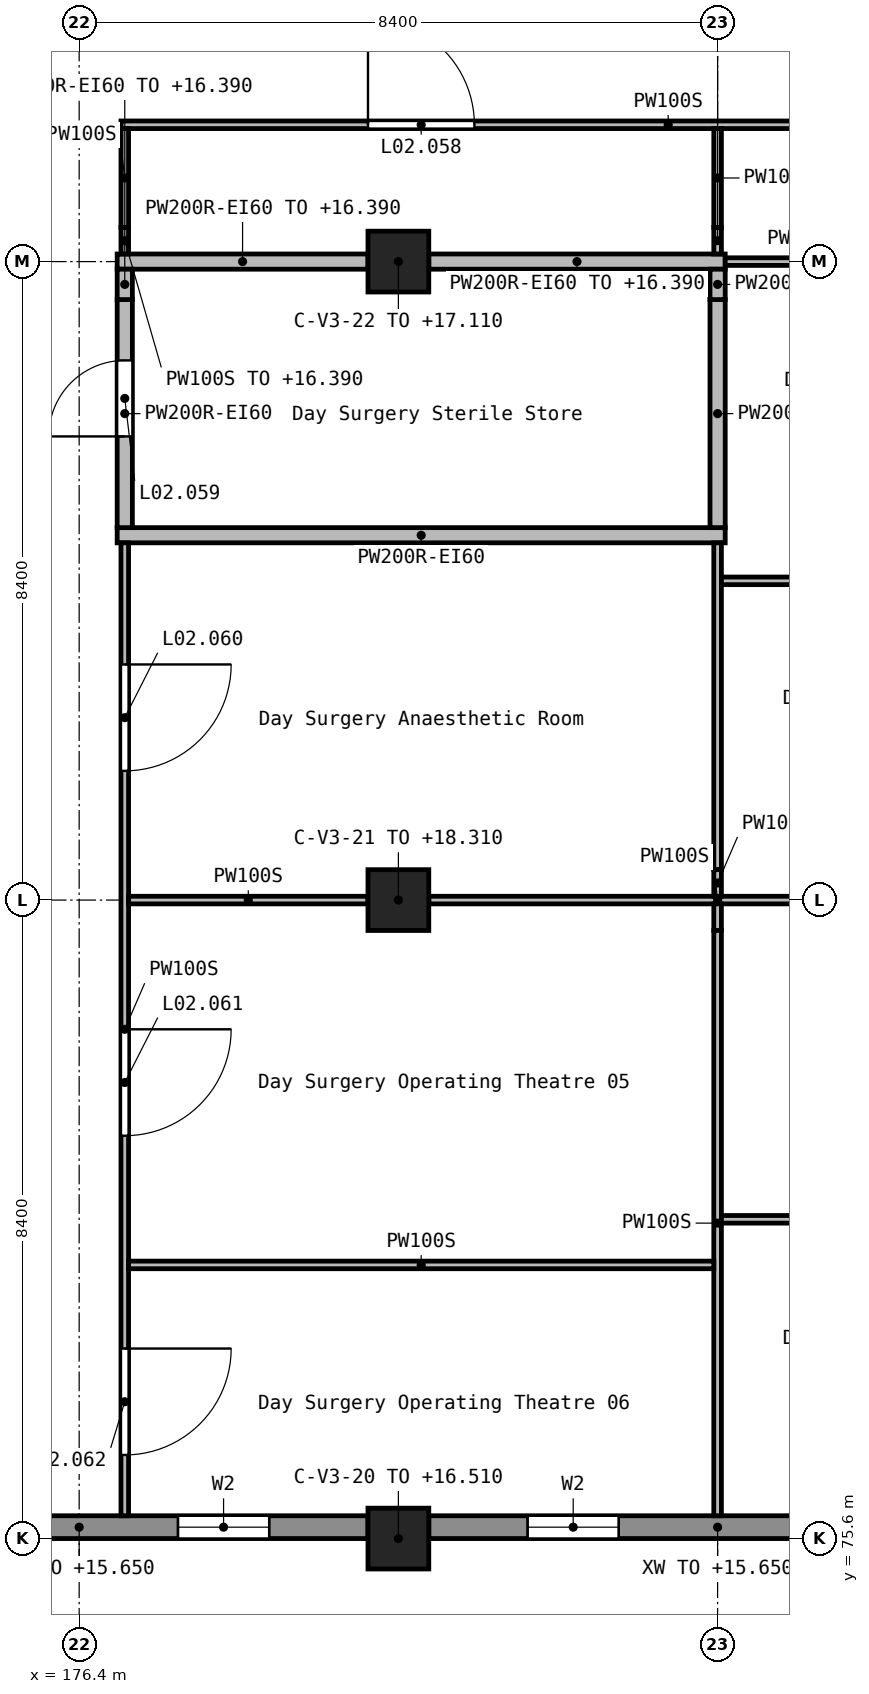
"""IFC4 building model, lengths in metres.
Left out: names, types, materials, properties, quantities, classifications, styles, units other than length and angle.
Written with IfcOpenShell. Run it as: python <this file> out.ifc"""

import sys

from ifc_helpers import new_model, si_unit, direction, frame, frame_2d, origin, origin_2d, place, context, subcontext, project, spatial, rectangle, extrude, element, fill, save


model = new_model("IFC4")
c1 = context("Model", 3, precision=1e-05, world=origin(), true_north=direction((0.0, 1.0)))
c2 = subcontext(c1, "Body", "Model", "MODEL_VIEW")
j1 = project(units=[si_unit("LENGTHUNIT", "METRE"), si_unit("PLANEANGLEUNIT", "RADIAN")], contexts=[c1])
p1 = place(None, origin())
s1 = spatial("IfcSite", under=j1, at=p1, CompositionType="ELEMENT")
p2 = place(p1, origin())
s2 = spatial("IfcBuilding", under=s1, at=p2, CompositionType="ELEMENT")
p3 = place(p2, frame((0.0, 0.0, 12.6)))
s3 = spatial("IfcBuildingStorey", under=s2, at=p3, CompositionType="ELEMENT", Elevation=12.6)
p4 = place(p3, frame((180.6, 75.6, 0.0), z_axis=(0.0, 0.0, 1.0), x_axis=(1.0, 0.0, 0.0)))
e1 = element("IfcColumn", 1, at=p4, inside=s3, PredefinedType="COLUMN", context=c2, shape_type="SweptSolid", body=[
    extrude(rectangle(XDim=0.8, YDim=0.8, at=origin_2d()), origin(), (0.0, 0.0, 1.0), 3.91),
])
p5 = place(p3, frame((180.6, 84.0, 0.0), z_axis=(0.0, 0.0, 1.0), x_axis=(1.0, 0.0, 0.0)))
e2 = element("IfcColumn", 2, at=p5, inside=s3, PredefinedType="COLUMN", context=c2, shape_type="SweptSolid", body=[
    extrude(rectangle(XDim=0.8, YDim=0.8, at=origin_2d()), origin(), (0.0, 0.0, 1.0), 5.71),
])
p6 = place(p3, frame((180.6, 92.4, 0.0), z_axis=(0.0, 0.0, 1.0), x_axis=(1.0, 0.0, 0.0)))
e3 = element("IfcColumn", 3, at=p6, inside=s3, PredefinedType="COLUMN", context=c2, shape_type="SweptSolid", body=[
    extrude(rectangle(XDim=0.8, YDim=0.8, at=origin_2d()), origin(), (0.0, 0.0, 1.0), 4.51),
])
p7 = place(p3, frame((172.6, 75.75, 0.0), z_axis=(0.0, 0.0, 1.0), x_axis=(1.0, 0.0, 0.0)))
e4 = element("IfcWall", 4, at=p7, inside=s3, PredefinedType="STANDARD", context=c2, shape_type="SweptSolid", body=[
    extrude(rectangle(XDim=7.6, YDim=0.3, at=frame_2d((3.8, 0.0))), origin(), (0.0, 0.0, 1.0), 3.05),
])
p8 = place(p7, frame((1.6, 0.0, 1.2)))
e5 = element("IfcOpeningElement", 5, at=p8, cuts=e4, PredefinedType="OPENING", context=c2, shape_type="SweptSolid", body=[
    extrude(rectangle(XDim=1.2, YDim=1.2, at=frame_2d((0.6, 0.6))), frame((0.0, 0.16, 0.0), z_axis=(0.0, -1.0, 0.0), x_axis=(1.0, 0.0, 0.0)), (0.0, 0.0, 1.0), 0.32),
])
p9 = place(p7, frame((5.1, 0.0, 1.2)))
e6 = element("IfcOpeningElement", 6, at=p9, cuts=e4, PredefinedType="OPENING", context=c2, shape_type="SweptSolid", body=[
    extrude(rectangle(XDim=1.2, YDim=1.2, at=frame_2d((0.6, 0.6))), frame((0.0, 0.16, 0.0), z_axis=(0.0, -1.0, 0.0), x_axis=(1.0, 0.0, 0.0)), (0.0, 0.0, 1.0), 0.32),
])
p10 = place(p3, frame((181.0, 75.75, 0.0), z_axis=(0.0, 0.0, 1.0), x_axis=(1.0, 0.0, 0.0)))
e7 = element("IfcWall", 7, at=p10, inside=s3, PredefinedType="STANDARD", context=c2, shape_type="SweptSolid", body=[
    extrude(rectangle(XDim=7.6, YDim=0.3, at=frame_2d((3.8, 0.0))), origin(), (0.0, 0.0, 1.0), 3.05),
])
p11 = place(p10, frame((1.3, 0.0, 1.2)))
e8 = element("IfcOpeningElement", 8, at=p11, cuts=e7, PredefinedType="OPENING", context=c2, shape_type="SweptSolid", body=[
    extrude(rectangle(XDim=1.2, YDim=1.2, at=frame_2d((0.6, 0.6))), frame((0.0, 0.16, 0.0), z_axis=(0.0, -1.0, 0.0), x_axis=(1.0, 0.0, 0.0)), (0.0, 0.0, 1.0), 0.32),
])
p12 = place(p10, frame((5.1, 0.0, 1.2)))
e9 = element("IfcOpeningElement", 9, at=p12, cuts=e7, PredefinedType="OPENING", context=c2, shape_type="SweptSolid", body=[
    extrude(rectangle(XDim=1.2, YDim=1.2, at=frame_2d((0.6, 0.6))), frame((0.0, 0.16, 0.0), z_axis=(0.0, -1.0, 0.0), x_axis=(1.0, 0.0, 0.0)), (0.0, 0.0, 1.0), 0.32),
])
p13 = place(p3, frame((176.9, 88.8, 0.0), z_axis=(0.0, 0.0, 1.0), x_axis=(1.0, 0.0, 0.0)))
e10 = element("IfcWall", 10, at=p13, inside=s3, PredefinedType="SOLIDWALL", context=c2, shape_type="SweptSolid", body=[
    extrude(rectangle(XDim=8.0, YDim=0.2, at=frame_2d((4.0, 0.0))), origin(), (0.0, 0.0, 1.0), 3.85),
])
p14 = place(p3, frame((176.9, 92.4, 0.0), z_axis=(0.0, 0.0, 1.0), x_axis=(1.0, 0.0, 0.0)))
e11 = element("IfcWall", 11, at=p14, inside=s3, PredefinedType="SOLIDWALL", context=c2, shape_type="SweptSolid", body=[
    extrude(rectangle(XDim=3.3, YDim=0.2, at=frame_2d((1.65, 0.0))), origin(), (0.0, 0.0, 1.0), 3.79),
])
p15 = place(p3, frame((181.0, 92.4, 0.0), z_axis=(0.0, 0.0, 1.0), x_axis=(1.0, 0.0, 0.0)))
e12 = element("IfcWall", 12, at=p15, inside=s3, PredefinedType="SOLIDWALL", context=c2, shape_type="SweptSolid", body=[
    extrude(rectangle(XDim=3.9, YDim=0.2, at=frame_2d((1.95, 0.0))), origin(), (0.0, 0.0, 1.0), 3.79),
])
p16 = place(p3, frame((177.0, 88.9, 0.0), z_axis=(0.0, 0.0, 1.0), x_axis=(0.0, 1.0, 0.0)))
e13 = element("IfcWall", 13, at=p16, inside=s3, PredefinedType="SOLIDWALL", context=c2, shape_type="SweptSolid", body=[
    extrude(rectangle(XDim=3.0, YDim=0.2, at=frame_2d((1.5, 0.0))), origin(), (0.0, 0.0, 1.0), 3.85),
])
p17 = place(p16, frame((1.2, 0.0, 0.0)))
e14 = element("IfcOpeningElement", 14, at=p17, cuts=e13, PredefinedType="OPENING", context=c2, shape_type="SweptSolid", body=[
    extrude(rectangle(XDim=1.0, YDim=2.1, at=frame_2d((0.5, 1.05))), frame((0.0, 0.11, 0.0), z_axis=(0.0, -1.0, 0.0), x_axis=(1.0, 0.0, 0.0)), (0.0, 0.0, 1.0), 0.22),
])
p18 = place(p3, frame((177.0, 91.9, 0.0), z_axis=(0.0, 0.0, 1.0), x_axis=(0.0, 1.0, 0.0)))
e15 = element("IfcWall", 15, at=p18, inside=s3, PredefinedType="SOLIDWALL", context=c2, shape_type="SweptSolid", body=[
    extrude(rectangle(XDim=0.4, YDim=0.2, at=frame_2d((0.2, 0.0))), origin(), (0.0, 0.0, 1.0), 3.79),
])
p19 = place(p3, frame((184.8, 88.9, 0.0), z_axis=(0.0, 0.0, 1.0), x_axis=(0.0, 1.0, 0.0)))
e16 = element("IfcWall", 16, at=p19, inside=s3, PredefinedType="SOLIDWALL", context=c2, shape_type="SweptSolid", body=[
    extrude(rectangle(XDim=3.0, YDim=0.2, at=frame_2d((1.5, 0.0))), origin(), (0.0, 0.0, 1.0), 3.85),
])
p20 = place(p3, frame((184.8, 91.9, 0.0), z_axis=(0.0, 0.0, 1.0), x_axis=(0.0, 1.0, 0.0)))
e17 = element("IfcWall", 17, at=p20, inside=s3, PredefinedType="SOLIDWALL", context=c2, shape_type="SweptSolid", body=[
    extrude(rectangle(XDim=0.4, YDim=0.2, at=frame_2d((0.2, 0.0))), origin(), (0.0, 0.0, 1.0), 3.79),
])
p21 = place(p3, frame((177.0, 88.7, 0.0), z_axis=(0.0, 0.0, 1.0), x_axis=(0.0, -1.0, 0.0)))
e18 = element("IfcWall", 18, at=p21, inside=s3, PredefinedType="PARTITIONING", context=c2, shape_type="SweptSolid", body=[
    extrude(rectangle(XDim=12.8, YDim=0.1, at=frame_2d((6.4, 0.0))), origin(), (0.0, 0.0, 1.0), 3.85),
])
p22 = place(p21, frame((1.6, 0.0, 0.0)))
e19 = element("IfcOpeningElement", 19, at=p22, cuts=e18, PredefinedType="OPENING", context=c2, shape_type="SweptSolid", body=[
    extrude(rectangle(XDim=1.4, YDim=2.1, at=frame_2d((0.7, 1.05))), frame((0.0, 0.06, 0.0), z_axis=(0.0, -1.0, 0.0), x_axis=(1.0, 0.0, 0.0)), (0.0, 0.0, 1.0), 0.12),
])
p23 = place(p21, frame((6.4, 0.0, 0.0)))
e20 = element("IfcOpeningElement", 20, at=p23, cuts=e18, PredefinedType="OPENING", context=c2, shape_type="SweptSolid", body=[
    extrude(rectangle(XDim=1.4, YDim=2.1, at=frame_2d((0.7, 1.05))), frame((0.0, 0.06, 0.0), z_axis=(0.0, -1.0, 0.0), x_axis=(1.0, 0.0, 0.0)), (0.0, 0.0, 1.0), 0.12),
])
p24 = place(p21, frame((10.6, 0.0, 0.0)))
e21 = element("IfcOpeningElement", 21, at=p24, cuts=e18, PredefinedType="OPENING", context=c2, shape_type="SweptSolid", body=[
    extrude(rectangle(XDim=1.4, YDim=2.1, at=frame_2d((0.7, 1.05))), frame((0.0, 0.06, 0.0), z_axis=(0.0, -1.0, 0.0), x_axis=(1.0, 0.0, 0.0)), (0.0, 0.0, 1.0), 0.12),
])
p25 = place(p3, frame((177.05, 84.0, 0.0), z_axis=(0.0, 0.0, 1.0), x_axis=(1.0, 0.0, 0.0)))
e22 = element("IfcWall", 22, at=p25, inside=s3, PredefinedType="PARTITIONING", context=c2, shape_type="SweptSolid", body=[
    extrude(rectangle(XDim=3.15, YDim=0.1, at=frame_2d((1.575, 0.0))), origin(), (0.0, 0.0, 1.0), 3.85),
])
p26 = place(p3, frame((181.0, 84.0, 0.0), z_axis=(0.0, 0.0, 1.0), x_axis=(1.0, 0.0, 0.0)))
e23 = element("IfcWall", 23, at=p26, inside=s3, PredefinedType="PARTITIONING", context=c2, shape_type="SweptSolid", body=[
    extrude(rectangle(XDim=7.6, YDim=0.1, at=frame_2d((3.8, 0.0))), origin(), (0.0, 0.0, 1.0), 3.85),
])
p27 = place(p3, frame((176.95, 94.2, 0.0), z_axis=(0.0, 0.0, 1.0), x_axis=(1.0, 0.0, 0.0)))
e24 = element("IfcWall", 24, at=p27, inside=s3, PredefinedType="PARTITIONING", context=c2, shape_type="SweptSolid", body=[
    extrude(rectangle(XDim=14.4, YDim=0.1, at=frame_2d((7.2, 0.0))), origin(), (0.0, 0.0, 1.0), 3.85),
])
p28 = place(p27, frame((3.25, 0.0, 0.0)))
e25 = element("IfcOpeningElement", 25, at=p28, cuts=e24, PredefinedType="OPENING", context=c2, shape_type="SweptSolid", body=[
    extrude(rectangle(XDim=1.4, YDim=2.1, at=frame_2d((0.7, 1.05))), frame((0.0, 0.06, 0.0), z_axis=(0.0, -1.0, 0.0), x_axis=(1.0, 0.0, 0.0)), (0.0, 0.0, 1.0), 0.12),
])
p29 = place(p27, frame((10.45, 0.0, 0.0)))
e26 = element("IfcOpeningElement", 26, at=p29, cuts=e24, PredefinedType="OPENING", context=c2, shape_type="SweptSolid", body=[
    extrude(rectangle(XDim=1.4, YDim=2.1, at=frame_2d((0.7, 1.05))), frame((0.0, 0.06, 0.0), z_axis=(0.0, -1.0, 0.0), x_axis=(1.0, 0.0, 0.0)), (0.0, 0.0, 1.0), 0.12),
])
p30 = place(p3, frame((184.8, 88.7, 0.0), z_axis=(0.0, 0.0, 1.0), x_axis=(0.0, -1.0, 0.0)))
e27 = element("IfcWall", 27, at=p30, inside=s3, PredefinedType="PARTITIONING", context=c2, shape_type="SweptSolid", body=[
    extrude(rectangle(XDim=4.3, YDim=0.1, at=frame_2d((2.15, 0.0))), origin(), (0.0, 0.0, 1.0), 3.85),
])
for number, where, z_axis, x_axis in (
    (28, (184.8, 84.4, 0.0), (0.0, 0.0, 1.0), (0.0, -1.0, 0.0)),
    (29, (184.8, 83.95, 0.0), (0.0, 0.0, 1.0), (0.0, -1.0, 0.0)),
):
    element("IfcWall", number, at=place(p3, frame(where, z_axis=z_axis, x_axis=x_axis)), inside=s3, PredefinedType="PARTITIONING", context=c2, shape_type="SweptSolid", body=[
        extrude(rectangle(XDim=0.35, YDim=0.1, at=frame_2d((0.175, 0.0))), origin(), (0.0, 0.0, 1.0), 3.85),
    ])
p31 = place(p3, frame((184.8, 83.6, 0.0), z_axis=(0.0, 0.0, 1.0), x_axis=(0.0, -1.0, 0.0)))
e30 = element("IfcWall", 30, at=p31, inside=s3, PredefinedType="PARTITIONING", context=c2, shape_type="SweptSolid", body=[
    extrude(rectangle(XDim=7.7, YDim=0.1, at=frame_2d((3.85, 0.0))), origin(), (0.0, 0.0, 1.0), 3.85),
])
p32 = place(p3, frame((177.05, 79.2, 0.0), z_axis=(0.0, 0.0, 1.0), x_axis=(1.0, 0.0, 0.0)))
e31 = element("IfcWall", 31, at=p32, inside=s3, PredefinedType="PARTITIONING", context=c2, shape_type="SweptSolid", body=[
    extrude(rectangle(XDim=7.7, YDim=0.1, at=frame_2d((3.85, 0.0))), origin(), (0.0, 0.0, 1.0), 3.85),
])
for number, where, z_axis, x_axis in (
    (32, (184.85, 79.8, 0.0), (0.0, 0.0, 1.0), (1.0, 0.0, 0.0)),
    (33, (184.85, 88.2, 0.0), (0.0, 0.0, 1.0), (1.0, 0.0, 0.0)),
):
    element("IfcWall", number, at=place(p3, frame(where, z_axis=z_axis, x_axis=x_axis)), inside=s3, PredefinedType="PARTITIONING", context=c2, shape_type="SweptSolid", body=[
        extrude(rectangle(XDim=6.5, YDim=0.1, at=frame_2d((3.25, 0.0))), origin(), (0.0, 0.0, 1.0), 3.85),
    ])
p33 = place(p3, frame((184.9, 92.4, 0.0), z_axis=(0.0, 0.0, 1.0), x_axis=(1.0, 0.0, 0.0)))
e34 = element("IfcWall", 34, at=p33, inside=s3, PredefinedType="PARTITIONING", context=c2, shape_type="SweptSolid", body=[
    extrude(rectangle(XDim=3.7, YDim=0.1, at=frame_2d((1.85, 0.0))), origin(), (0.0, 0.0, 1.0), 3.79),
])
p34 = place(p3, frame((177.0, 92.5, 0.0), z_axis=(0.0, 0.0, 1.0), x_axis=(0.0, 1.0, 0.0)))
e35 = element("IfcWall", 35, at=p34, inside=s3, PredefinedType="PARTITIONING", context=c2, shape_type="SweptSolid", body=[
    extrude(rectangle(XDim=0.35, YDim=0.1, at=frame_2d((0.175, 0.0))), origin(), (0.0, 0.0, 1.0), 3.79),
])
p35 = place(p3, frame((177.0, 92.85, 0.0), z_axis=(0.0, 0.0, 1.0), x_axis=(0.0, 1.0, 0.0)))
e36 = element("IfcWall", 36, at=p35, inside=s3, PredefinedType="PARTITIONING", context=c2, shape_type="SweptSolid", body=[
    extrude(rectangle(XDim=1.3, YDim=0.1, at=frame_2d((0.65, 0.0))), origin(), (0.0, 0.0, 1.0), 3.85),
])
p36 = place(p3, frame((184.8, 92.5, 0.0), z_axis=(0.0, 0.0, 1.0), x_axis=(0.0, 1.0, 0.0)))
e37 = element("IfcWall", 37, at=p36, inside=s3, PredefinedType="PARTITIONING", context=c2, shape_type="SweptSolid", body=[
    extrude(rectangle(XDim=0.35, YDim=0.1, at=frame_2d((0.175, 0.0))), origin(), (0.0, 0.0, 1.0), 3.79),
])
p37 = place(p3, frame((184.8, 92.85, 0.0), z_axis=(0.0, 0.0, 1.0), x_axis=(0.0, 1.0, 0.0)))
e38 = element("IfcWall", 38, at=p37, inside=s3, PredefinedType="PARTITIONING", context=c2, shape_type="SweptSolid", body=[
    extrude(rectangle(XDim=1.3, YDim=0.1, at=frame_2d((0.65, 0.0))), origin(), (0.0, 0.0, 1.0), 3.85),
])
p38 = place(p9, origin())
e39 = element("IfcWindow", 39, at=p38, inside=s3, PartitioningType="SINGLE_PANEL", PredefinedType="WINDOW", context=c2, shape_type="SweptSolid", body=[
    extrude(rectangle(XDim=1.2, YDim=1.2, at=frame_2d((0.6, 0.6))), frame((0.0, 0.03, 0.0), z_axis=(0.0, -1.0, 0.0), x_axis=(1.0, 0.0, 0.0)), (0.0, 0.0, 1.0), 0.06),
])
fill(e6, e39)
p39 = place(p11, origin())
e40 = element("IfcWindow", 40, at=p39, inside=s3, PartitioningType="SINGLE_PANEL", PredefinedType="WINDOW", context=c2, shape_type="SweptSolid", body=[
    extrude(rectangle(XDim=1.2, YDim=1.2, at=frame_2d((0.6, 0.6))), frame((0.0, 0.03, 0.0), z_axis=(0.0, -1.0, 0.0), x_axis=(1.0, 0.0, 0.0)), (0.0, 0.0, 1.0), 0.06),
])
fill(e8, e40)
p40 = place(p28, frame((1.4, 0.0, 0.0), z_axis=(0.0, 0.0, 1.0), x_axis=(-1.0, 0.0, 0.0)))
e41 = element("IfcDoor", 41, at=p40, inside=s3, OperationType="DOUBLE_DOOR_SINGLE_SWING", PredefinedType="DOOR", context=c2, shape_type="SweptSolid", body=[
    extrude(rectangle(XDim=1.4, YDim=2.1, at=frame_2d((0.7, 1.05))), frame((0.0, 0.025, 0.0), z_axis=(0.0, -1.0, 0.0), x_axis=(1.0, 0.0, 0.0)), (0.0, 0.0, 1.0), 0.05),
])
fill(e25, e41)
p41 = place(p17, frame((1.0, 0.0, 0.0), z_axis=(0.0, 0.0, 1.0), x_axis=(-1.0, 0.0, 0.0)))
e42 = element("IfcDoor", 42, at=p41, inside=s3, OperationType="SINGLE_SWING_LEFT", PredefinedType="DOOR", context=c2, shape_type="SweptSolid", body=[
    extrude(rectangle(XDim=1.0, YDim=2.1, at=frame_2d((0.5, 1.05))), frame((0.0, 0.025, 0.0), z_axis=(0.0, -1.0, 0.0), x_axis=(1.0, 0.0, 0.0)), (0.0, 0.0, 1.0), 0.05),
])
fill(e14, e42)
p42 = place(p22, origin())
e43 = element("IfcDoor", 43, at=p42, inside=s3, OperationType="DOUBLE_DOOR_SINGLE_SWING", PredefinedType="DOOR", context=c2, shape_type="SweptSolid", body=[
    extrude(rectangle(XDim=1.4, YDim=2.1, at=frame_2d((0.7, 1.05))), frame((0.0, 0.025, 0.0), z_axis=(0.0, -1.0, 0.0), x_axis=(1.0, 0.0, 0.0)), (0.0, 0.0, 1.0), 0.05),
])
fill(e19, e43)
p43 = place(p23, origin())
e44 = element("IfcDoor", 44, at=p43, inside=s3, OperationType="DOUBLE_DOOR_SINGLE_SWING", PredefinedType="DOOR", context=c2, shape_type="SweptSolid", body=[
    extrude(rectangle(XDim=1.4, YDim=2.1, at=frame_2d((0.7, 1.05))), frame((0.0, 0.025, 0.0), z_axis=(0.0, -1.0, 0.0), x_axis=(1.0, 0.0, 0.0)), (0.0, 0.0, 1.0), 0.05),
])
fill(e20, e44)
p44 = place(p24, origin())
e45 = element("IfcDoor", 45, at=p44, inside=s3, OperationType="DOUBLE_DOOR_SINGLE_SWING", PredefinedType="DOOR", context=c2, shape_type="SweptSolid", body=[
    extrude(rectangle(XDim=1.4, YDim=2.1, at=frame_2d((0.7, 1.05))), frame((0.0, 0.025, 0.0), z_axis=(0.0, -1.0, 0.0), x_axis=(1.0, 0.0, 0.0)), (0.0, 0.0, 1.0), 0.05),
])
fill(e21, e45)
save(model, sys.argv[1])
